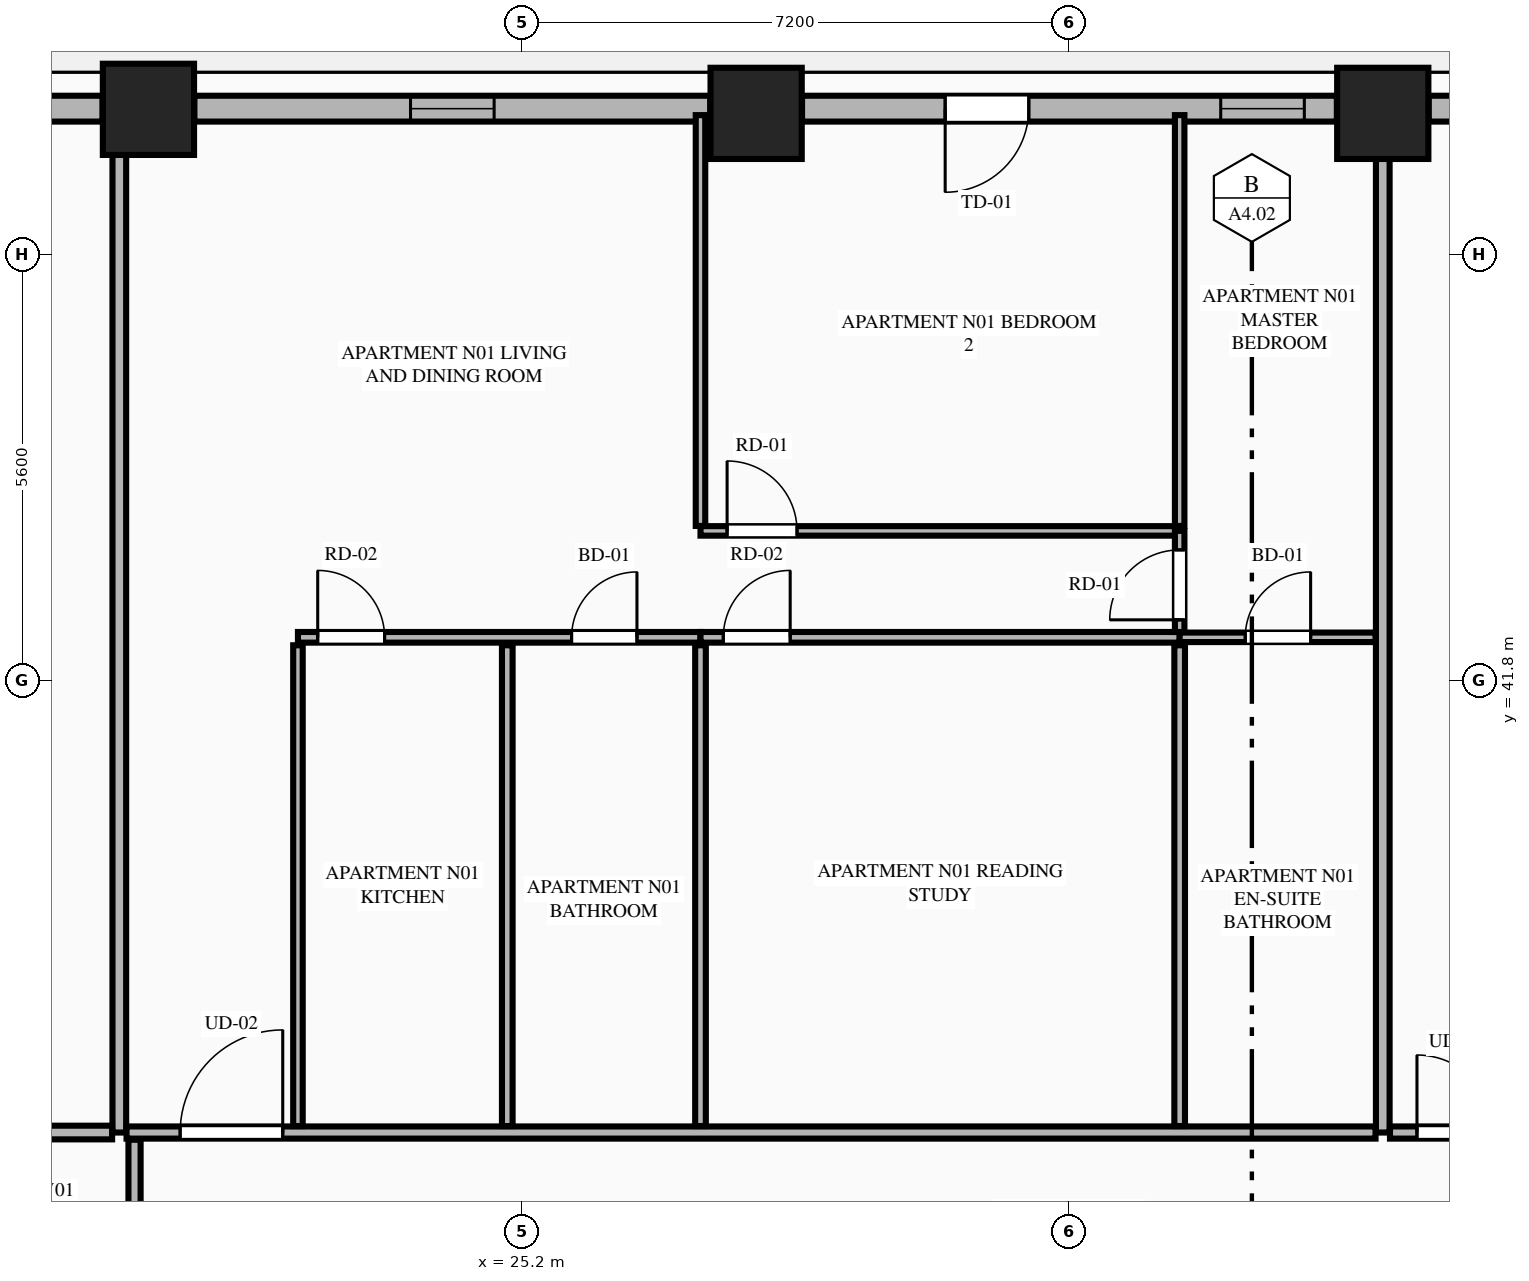
"""IFC4 building model, lengths in metres.
Left out: names, types, materials, properties, quantities, classifications, styles, units other than length and angle.
Written with IfcOpenShell. Run it as: python <this file> out.ifc"""

import sys

from ifc_helpers import new_model, si_unit, direction, frame, frame_2d, origin, origin_2d, place, context, subcontext, project, spatial, rectangle, extrude, element, fill, save


model = new_model("IFC4")
c1 = context("Model", 3, precision=1e-05, world=origin(), true_north=direction((0.0, 1.0)))
c2 = subcontext(c1, "Body", "Model", "MODEL_VIEW")
j1 = project(units=[si_unit("LENGTHUNIT", "METRE"), si_unit("PLANEANGLEUNIT", "RADIAN")], contexts=[c1])
p1 = place(None, origin())
s1 = spatial("IfcSite", under=j1, at=p1, CompositionType="ELEMENT")
p2 = place(p1, origin())
s2 = spatial("IfcBuilding", under=s1, at=p2, CompositionType="ELEMENT")
p3 = place(p2, frame((0.0, 0.0, 53.3)))
s3 = spatial("IfcBuildingStorey", under=s2, at=p3, CompositionType="ELEMENT", Elevation=53.3)
for number, where, z_axis, x_axis in (
    (1, (36.522, 49.258, 0.0), (0.0, 0.0, 1.0), (1.0, 0.0, 0.0)),
    (2, (28.278, 49.258, 0.0), (0.0, 0.0, 1.0), (1.0, 0.0, 0.0)),
    (3, (20.283, 49.311, 0.0), (0.0, 0.0, 1.0), (1.0, 0.0, 0.0)),
):
    element("IfcColumn", number, at=place(p3, frame(where, z_axis=z_axis, x_axis=x_axis)), inside=s3, PredefinedType="COLUMN", context=c2, shape_type="SweptSolid", body=[
        extrude(rectangle(XDim=1.2, YDim=1.2, at=origin_2d()), origin(), (0.0, 0.0, 1.0), 3.55),
    ])
p4 = place(p3, frame((43.913, 49.32, 0.0), z_axis=(0.0, 0.0, 1.0), x_axis=(-1.0, 0.0, 0.0)))
e4 = element("IfcWall", 4, at=p4, inside=s3, PredefinedType="STANDARD", context=c2, shape_type="SweptSolid", body=[
    extrude(rectangle(XDim=6.787, YDim=0.34, at=frame_2d((3.394, 0.0))), origin(), (0.0, 0.0, 1.0), 2.787),
])
p5 = place(p4, frame((2.843, 0.0, 0.75)))
e5 = element("IfcOpeningElement", 5, at=p5, cuts=e4, PredefinedType="OPENING", context=c2, shape_type="SweptSolid", body=[
    extrude(rectangle(XDim=1.1, YDim=1.887, at=frame_2d((0.55, 0.943))), frame((0.0, 0.18, 0.0), z_axis=(0.0, -1.0, 0.0), x_axis=(1.0, 0.0, 0.0)), (0.0, 0.0, 1.0), 0.36),
])
p6 = place(p3, frame((35.918, 49.32, 0.0), z_axis=(0.0, 0.0, 1.0), x_axis=(-1.0, 0.0, 0.0)))
e6 = element("IfcWall", 6, at=p6, inside=s3, PredefinedType="STANDARD", context=c2, shape_type="SweptSolid", body=[
    extrude(rectangle(XDim=7.036, YDim=0.34, at=frame_2d((3.518, 0.0))), origin(), (0.0, 0.0, 1.0), 2.787),
])
p7 = place(p6, frame((4.053, 0.0, 0.0)))
e7 = element("IfcOpeningElement", 7, at=p7, cuts=e6, PredefinedType="OPENING", context=c2, shape_type="SweptSolid", body=[
    extrude(rectangle(XDim=1.1, YDim=2.25, at=frame_2d((0.55, 1.125))), frame((0.0, 0.18, 0.0), z_axis=(0.0, -1.0, 0.0), x_axis=(1.0, 0.0, 0.0)), (0.0, 0.0, 1.0), 0.36),
])
p8 = place(p6, frame((0.428, 0.0, 0.75)))
e8 = element("IfcOpeningElement", 8, at=p8, cuts=e6, PredefinedType="OPENING", context=c2, shape_type="SweptSolid", body=[
    extrude(rectangle(XDim=1.1, YDim=1.887, at=frame_2d((0.55, 0.943))), frame((0.0, 0.18, 0.0), z_axis=(0.0, -1.0, 0.0), x_axis=(1.0, 0.0, 0.0)), (0.0, 0.0, 1.0), 0.36),
])
p9 = place(p3, frame((27.674, 49.32, 0.0), z_axis=(0.0, 0.0, 1.0), x_axis=(-1.0, 0.0, 0.0)))
e9 = element("IfcWall", 9, at=p9, inside=s3, PredefinedType="STANDARD", context=c2, shape_type="SweptSolid", body=[
    extrude(rectangle(XDim=6.787, YDim=0.34, at=frame_2d((3.394, 0.0))), origin(), (0.0, 0.0, 1.0), 2.787),
])
p10 = place(p9, frame((2.843, 0.0, 0.75)))
e10 = element("IfcOpeningElement", 10, at=p10, cuts=e9, PredefinedType="OPENING", context=c2, shape_type="SweptSolid", body=[
    extrude(rectangle(XDim=1.1, YDim=1.887, at=frame_2d((0.55, 0.943))), frame((0.0, 0.18, 0.0), z_axis=(0.0, -1.0, 0.0), x_axis=(1.0, 0.0, 0.0)), (0.0, 0.0, 1.0), 0.36),
])
p11 = place(p3, frame((19.679, 49.32, 0.0), z_axis=(0.0, 0.0, 1.0), x_axis=(-1.0, 0.0, 0.0)))
e11 = element("IfcWall", 11, at=p11, inside=s3, PredefinedType="STANDARD", context=c2, shape_type="SweptSolid", body=[
    extrude(rectangle(XDim=1.245, YDim=0.34, at=frame_2d((0.623, 0.0))), origin(), (0.0, 0.0, 1.0), 3.33),
])
p12 = place(p3, frame((19.9, 35.85, 0.0), z_axis=(0.0, 0.0, 1.0), x_axis=(0.0, 1.0, 0.0)))
e12 = element("IfcWall", 12, at=p12, inside=s3, PredefinedType="PARTITIONING", context=c2, shape_type="SweptSolid", body=[
    extrude(rectangle(XDim=13.295, YDim=0.18, at=frame_2d((6.647, 0.0))), origin(), (0.0, 0.0, 1.0), 3.33),
])
p13 = place(p3, frame((36.522, 35.85, 0.0), z_axis=(0.0, 0.0, 1.0), x_axis=(0.0, 1.0, 0.0)))
e13 = element("IfcWall", 13, at=p13, inside=s3, PredefinedType="PARTITIONING", context=c2, shape_type="SweptSolid", body=[
    extrude(rectangle(XDim=13.295, YDim=0.18, at=frame_2d((6.647, 0.0))), origin(), (0.0, 0.0, 1.0), 2.637),
])
p14 = place(p3, frame((19.995, 35.85, 0.0), z_axis=(0.0, 0.0, 1.0), x_axis=(1.0, 0.0, 0.0)))
e14 = element("IfcWall", 14, at=p14, inside=s3, PredefinedType="PARTITIONING", context=c2, shape_type="SweptSolid", body=[
    extrude(rectangle(XDim=16.432, YDim=0.16, at=frame_2d((8.216, 0.0))), origin(), (0.0, 0.0, 1.0), 3.33),
])
p15 = place(p14, frame((0.705, 0.0, 0.0)))
e15 = element("IfcOpeningElement", 15, at=p15, cuts=e14, PredefinedType="OPENING", context=c2, shape_type="SweptSolid", body=[
    extrude(rectangle(XDim=1.35, YDim=2.35, at=frame_2d((0.675, 1.175))), frame((0.0, 0.09, 0.0), z_axis=(0.0, -1.0, 0.0), x_axis=(1.0, 0.0, 0.0)), (0.0, 0.0, 1.0), 0.18),
])
p16 = place(p3, frame((22.25, 35.935, 0.0), z_axis=(0.0, 0.0, 1.0), x_axis=(0.0, 1.0, 0.0)))
e16 = element("IfcWall", 16, at=p16, inside=s3, PredefinedType="PARTITIONING", context=c2, shape_type="SweptSolid", body=[
    extrude(rectangle(XDim=6.325, YDim=0.125, at=frame_2d((3.163, 0.0))), origin(), (0.0, 0.0, 1.0), 2.637),
])
p17 = place(p3, frame((22.25, 42.365, 0.0), z_axis=(0.0, 0.0, 1.0), x_axis=(1.0, 0.0, 0.0)))
e17 = element("IfcWall", 17, at=p17, inside=s3, PredefinedType="PLUMBINGWALL", context=c2, shape_type="SweptSolid", body=[
    extrude(rectangle(XDim=5.296, YDim=0.14, at=frame_2d((2.648, 0.0))), origin(), (0.0, 0.0, 1.0), 3.33),
])
p18 = place(p17, frame((3.6, 0.0, 0.0)))
e18 = element("IfcOpeningElement", 18, at=p18, cuts=e17, PredefinedType="OPENING", context=c2, shape_type="SweptSolid", body=[
    extrude(rectangle(XDim=0.86, YDim=2.1, at=frame_2d((0.43, 1.05))), frame((0.0, 0.08, 0.0), z_axis=(0.0, -1.0, 0.0), x_axis=(1.0, 0.0, 0.0)), (0.0, 0.0, 1.0), 0.16),
])
p19 = place(p17, frame((0.26, 0.0, 0.0)))
e19 = element("IfcOpeningElement", 19, at=p19, cuts=e17, PredefinedType="OPENING", context=c2, shape_type="SweptSolid", body=[
    extrude(rectangle(XDim=0.88, YDim=2.15, at=frame_2d((0.44, 1.075))), frame((0.0, 0.08, 0.0), z_axis=(0.0, -1.0, 0.0), x_axis=(1.0, 0.0, 0.0)), (0.0, 0.0, 1.0), 0.16),
])
p20 = place(p3, frame((27.546, 42.365, 0.0), z_axis=(0.0, 0.0, 1.0), x_axis=(1.0, 0.0, 0.0)))
e20 = element("IfcWall", 20, at=p20, inside=s3, PredefinedType="PLUMBINGWALL", context=c2, shape_type="SweptSolid", body=[
    extrude(rectangle(XDim=6.304, YDim=0.14, at=frame_2d((3.152, 0.0))), origin(), (0.0, 0.0, 1.0), 3.33),
])
p21 = place(p20, frame((0.3, 0.0, 0.0)))
e21 = element("IfcOpeningElement", 21, at=p21, cuts=e20, PredefinedType="OPENING", context=c2, shape_type="SweptSolid", body=[
    extrude(rectangle(XDim=0.88, YDim=2.15, at=frame_2d((0.44, 1.075))), frame((0.0, 0.08, 0.0), z_axis=(0.0, -1.0, 0.0), x_axis=(1.0, 0.0, 0.0)), (0.0, 0.0, 1.0), 0.16),
])
p22 = place(p3, frame((33.85, 42.365, 0.0), z_axis=(0.0, 0.0, 1.0), x_axis=(1.0, 0.0, 0.0)))
e22 = element("IfcWall", 22, at=p22, inside=s3, PredefinedType="PARTITIONING", context=c2, shape_type="SweptSolid", body=[
    extrude(rectangle(XDim=2.577, YDim=0.125, at=frame_2d((1.289, 0.0))), origin(), (0.0, 0.0, 1.0), 3.33),
])
p23 = place(p22, frame((0.863, 0.0, 0.0)))
e23 = element("IfcOpeningElement", 23, at=p23, cuts=e22, PredefinedType="OPENING", context=c2, shape_type="SweptSolid", body=[
    extrude(rectangle(XDim=0.86, YDim=2.1, at=frame_2d((0.43, 1.05))), frame((0.0, 0.073, 0.0), z_axis=(0.0, -1.0, 0.0), x_axis=(1.0, 0.0, 0.0)), (0.0, 0.0, 1.0), 0.145),
])
p24 = place(p3, frame((25.004, 35.935, 0.0), z_axis=(0.0, 0.0, 1.0), x_axis=(0.0, 1.0, 0.0)))
e24 = element("IfcWall", 24, at=p24, inside=s3, PredefinedType="PLUMBINGWALL", context=c2, shape_type="SweptSolid", body=[
    extrude(rectangle(XDim=6.325, YDim=0.14, at=frame_2d((3.163, 0.0))), origin(), (0.0, 0.0, 1.0), 3.33),
])
p25 = place(p3, frame((27.546, 43.83, 0.0), z_axis=(0.0, 0.0, 1.0), x_axis=(0.0, 1.0, 0.0)))
e25 = element("IfcWall", 25, at=p25, inside=s3, PredefinedType="PARTITIONING", context=c2, shape_type="SweptSolid", body=[
    extrude(rectangle(XDim=5.405, YDim=0.125, at=frame_2d((2.703, 0.0))), origin(), (0.0, 0.0, 1.0), 3.33),
])
p26 = place(p3, frame((27.546, 43.765, 0.0), z_axis=(0.0, 0.0, 1.0), x_axis=(1.0, 0.0, 0.0)))
e26 = element("IfcWall", 26, at=p26, inside=s3, PredefinedType="PARTITIONING", context=c2, shape_type="SweptSolid", body=[
    extrude(rectangle(XDim=6.304, YDim=0.125, at=frame_2d((3.152, 0.0))), origin(), (0.0, 0.0, 1.0), 3.33),
])
p27 = place(p26, frame((0.35, 0.0, 0.0)))
e27 = element("IfcOpeningElement", 27, at=p27, cuts=e26, PredefinedType="OPENING", context=c2, shape_type="SweptSolid", body=[
    extrude(rectangle(XDim=0.92, YDim=2.15, at=frame_2d((0.46, 1.075))), frame((0.0, 0.073, 0.0), z_axis=(0.0, -1.0, 0.0), x_axis=(1.0, 0.0, 0.0)), (0.0, 0.0, 1.0), 0.145),
])
p28 = place(p3, frame((33.85, 42.435, 0.0), z_axis=(0.0, 0.0, 1.0), x_axis=(0.0, 1.0, 0.0)))
e28 = element("IfcWall", 28, at=p28, inside=s3, PredefinedType="PARTITIONING", context=c2, shape_type="SweptSolid", body=[
    extrude(rectangle(XDim=1.33, YDim=0.125, at=frame_2d((0.665, 0.0))), origin(), (0.0, 0.0, 1.0), 3.33),
])
p29 = place(p28, frame((0.16, 0.0, 0.0)))
e29 = element("IfcOpeningElement", 29, at=p29, cuts=e28, PredefinedType="OPENING", context=c2, shape_type="SweptSolid", body=[
    extrude(rectangle(XDim=0.92, YDim=2.15, at=frame_2d((0.46, 1.075))), frame((0.0, 0.073, 0.0), z_axis=(0.0, -1.0, 0.0), x_axis=(1.0, 0.0, 0.0)), (0.0, 0.0, 1.0), 0.145),
])
for number, where, z_axis, x_axis in (
    (30, (27.546, 35.935, 0.0), (0.0, 0.0, 1.0), (0.0, 1.0, 0.0)),
    (31, (33.85, 35.935, 0.0), (0.0, 0.0, 1.0), (0.0, 1.0, 0.0)),
):
    element("IfcWall", number, at=place(p3, frame(where, z_axis=z_axis, x_axis=x_axis)), inside=s3, PredefinedType="PLUMBINGWALL", context=c2, shape_type="SweptSolid", body=[
        extrude(rectangle(XDim=6.325, YDim=0.14, at=frame_2d((3.163, 0.0))), origin(), (0.0, 0.0, 1.0), 3.33),
    ])
p30 = place(p3, frame((33.85, 43.83, 0.0), z_axis=(0.0, 0.0, 1.0), x_axis=(0.0, 1.0, 0.0)))
e32 = element("IfcWall", 32, at=p30, inside=s3, PredefinedType="PARTITIONING", context=c2, shape_type="SweptSolid", body=[
    extrude(rectangle(XDim=5.405, YDim=0.125, at=frame_2d((2.703, 0.0))), origin(), (0.0, 0.0, 1.0), 3.33),
])
p31 = place(p3, frame((36.617, 35.85, 0.0), z_axis=(0.0, 0.0, 1.0), x_axis=(1.0, 0.0, 0.0)))
e33 = element("IfcWall", 33, at=p31, inside=s3, PredefinedType="PARTITIONING", context=c2, shape_type="SweptSolid", body=[
    extrude(rectangle(XDim=8.188, YDim=0.16, at=frame_2d((4.094, 0.0))), origin(), (0.0, 0.0, 1.0), 3.33),
])
p32 = place(p31, frame((0.355, 0.0, 0.0)))
e34 = element("IfcOpeningElement", 34, at=p32, cuts=e33, PredefinedType="OPENING", context=c2, shape_type="SweptSolid", body=[
    extrude(rectangle(XDim=1.02, YDim=2.25, at=frame_2d((0.51, 1.125))), frame((0.0, 0.09, 0.0), z_axis=(0.0, -1.0, 0.0), x_axis=(1.0, 0.0, 0.0)), (0.0, 0.0, 1.0), 0.18),
])
p33 = place(p3, frame((10.665, 35.85, 0.0), z_axis=(0.0, 0.0, 1.0), x_axis=(1.0, 0.0, 0.0)))
e35 = element("IfcWall", 35, at=p33, inside=s3, PredefinedType="PARTITIONING", context=c2, shape_type="SweptSolid", body=[
    extrude(rectangle(XDim=9.14, YDim=0.18, at=frame_2d((4.57, 0.0))), origin(), (0.0, 0.0, 1.0), 3.33),
])
p34 = place(p3, frame((20.1, 16.045, 0.0), z_axis=(0.0, 0.0, 1.0), x_axis=(0.0, 1.0, 0.0)))
e36 = element("IfcWall", 36, at=p34, inside=s3, PredefinedType="PARTITIONING", context=c2, shape_type="SweptSolid", body=[
    extrude(rectangle(XDim=19.71, YDim=0.16, at=frame_2d((9.855, 0.0))), origin(), (0.0, 0.0, 1.0), 3.33),
])
p35 = place(p34, frame((0.45, 0.0, 0.0)))
e37 = element("IfcOpeningElement", 37, at=p35, cuts=e36, PredefinedType="OPENING", context=c2, shape_type="SweptSolid", body=[
    extrude(rectangle(XDim=1.02, YDim=2.25, at=frame_2d((0.51, 1.125))), frame((0.0, 0.09, 0.0), z_axis=(0.0, -1.0, 0.0), x_axis=(1.0, 0.0, 0.0)), (0.0, 0.0, 1.0), 0.18),
])
p36 = place(p7, origin())
e38 = element("IfcDoor", 38, at=p36, inside=s3, OperationType="SINGLE_SWING_RIGHT", PredefinedType="DOOR", context=c2, shape_type="SweptSolid", body=[
    extrude(rectangle(XDim=1.1, YDim=2.25, at=frame_2d((0.55, 1.125))), frame((0.0, 0.025, 0.0), z_axis=(0.0, -1.0, 0.0), x_axis=(1.0, 0.0, 0.0)), (0.0, 0.0, 1.0), 0.05),
])
fill(e7, e38)
p37 = place(p10, origin())
e39 = element("IfcWindow", 39, at=p37, inside=s3, PartitioningType="SINGLE_PANEL", PredefinedType="WINDOW", context=c2, shape_type="SweptSolid", body=[
    extrude(rectangle(XDim=1.1, YDim=1.887, at=frame_2d((0.55, 0.943))), frame((0.0, 0.03, 0.0), z_axis=(0.0, -1.0, 0.0), x_axis=(1.0, 0.0, 0.0)), (0.0, 0.0, 1.0), 0.06),
])
fill(e10, e39)
p38 = place(p18, origin())
e40 = element("IfcDoor", 40, at=p38, inside=s3, OperationType="SINGLE_SWING_RIGHT", PredefinedType="DOOR", context=c2, shape_type="SweptSolid", body=[
    extrude(rectangle(XDim=0.86, YDim=2.1, at=frame_2d((0.43, 1.05))), frame((0.0, 0.025, 0.0), z_axis=(0.0, -1.0, 0.0), x_axis=(1.0, 0.0, 0.0)), (0.0, 0.0, 1.0), 0.05),
])
fill(e18, e40)
p39 = place(p23, origin())
e41 = element("IfcDoor", 41, at=p39, inside=s3, OperationType="SINGLE_SWING_RIGHT", PredefinedType="DOOR", context=c2, shape_type="SweptSolid", body=[
    extrude(rectangle(XDim=0.86, YDim=2.1, at=frame_2d((0.43, 1.05))), frame((0.0, 0.025, 0.0), z_axis=(0.0, -1.0, 0.0), x_axis=(1.0, 0.0, 0.0)), (0.0, 0.0, 1.0), 0.05),
])
fill(e23, e41)
p40 = place(p15, origin())
e42 = element("IfcDoor", 42, at=p40, inside=s3, OperationType="SINGLE_SWING_RIGHT", PredefinedType="DOOR", context=c2, shape_type="SweptSolid", body=[
    extrude(rectangle(XDim=1.35, YDim=2.35, at=frame_2d((0.675, 1.175))), frame((0.0, 0.025, 0.0), z_axis=(0.0, -1.0, 0.0), x_axis=(1.0, 0.0, 0.0)), (0.0, 0.0, 1.0), 0.05),
])
fill(e15, e42)
p41 = place(p19, origin())
e43 = element("IfcDoor", 43, at=p41, inside=s3, OperationType="SINGLE_SWING_LEFT", PredefinedType="DOOR", context=c2, shape_type="SweptSolid", body=[
    extrude(rectangle(XDim=0.88, YDim=2.15, at=frame_2d((0.44, 1.075))), frame((0.0, 0.025, 0.0), z_axis=(0.0, -1.0, 0.0), x_axis=(1.0, 0.0, 0.0)), (0.0, 0.0, 1.0), 0.05),
])
fill(e19, e43)
p42 = place(p21, origin())
e44 = element("IfcDoor", 44, at=p42, inside=s3, OperationType="SINGLE_SWING_RIGHT", PredefinedType="DOOR", context=c2, shape_type="SweptSolid", body=[
    extrude(rectangle(XDim=0.88, YDim=2.15, at=frame_2d((0.44, 1.075))), frame((0.0, 0.025, 0.0), z_axis=(0.0, -1.0, 0.0), x_axis=(1.0, 0.0, 0.0)), (0.0, 0.0, 1.0), 0.05),
])
fill(e21, e44)
p43 = place(p27, origin())
e45 = element("IfcDoor", 45, at=p43, inside=s3, OperationType="SINGLE_SWING_LEFT", PredefinedType="DOOR", context=c2, shape_type="SweptSolid", body=[
    extrude(rectangle(XDim=0.92, YDim=2.15, at=frame_2d((0.46, 1.075))), frame((0.0, 0.025, 0.0), z_axis=(0.0, -1.0, 0.0), x_axis=(1.0, 0.0, 0.0)), (0.0, 0.0, 1.0), 0.05),
])
fill(e27, e45)
p44 = place(p29, origin())
e46 = element("IfcDoor", 46, at=p44, inside=s3, OperationType="SINGLE_SWING_LEFT", PredefinedType="DOOR", context=c2, shape_type="SweptSolid", body=[
    extrude(rectangle(XDim=0.92, YDim=2.15, at=frame_2d((0.46, 1.075))), frame((0.0, 0.025, 0.0), z_axis=(0.0, -1.0, 0.0), x_axis=(1.0, 0.0, 0.0)), (0.0, 0.0, 1.0), 0.05),
])
fill(e29, e46)
p45 = place(p32, origin())
e47 = element("IfcDoor", 47, at=p45, inside=s3, OperationType="SINGLE_SWING_LEFT", PredefinedType="DOOR", context=c2, shape_type="SweptSolid", body=[
    extrude(rectangle(XDim=1.02, YDim=2.25, at=frame_2d((0.51, 1.125))), frame((0.0, 0.025, 0.0), z_axis=(0.0, -1.0, 0.0), x_axis=(1.0, 0.0, 0.0)), (0.0, 0.0, 1.0), 0.05),
])
fill(e34, e47)
p46 = place(p8, origin())
e48 = element("IfcWindow", 48, at=p46, inside=s3, PartitioningType="SINGLE_PANEL", PredefinedType="WINDOW", context=c2, shape_type="SweptSolid", body=[
    extrude(rectangle(XDim=1.1, YDim=1.887, at=frame_2d((0.55, 0.943))), frame((0.0, 0.03, 0.0), z_axis=(0.0, -1.0, 0.0), x_axis=(1.0, 0.0, 0.0)), (0.0, 0.0, 1.0), 0.06),
])
fill(e8, e48)
save(model, sys.argv[1])
